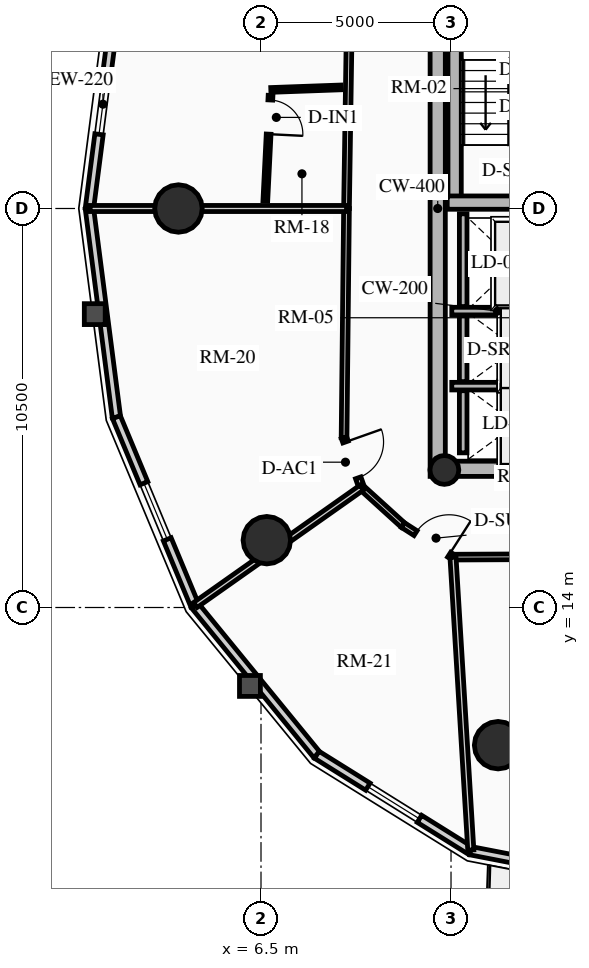
"""IFC4 building model, lengths in metres.
Left out: names, types, materials, properties, quantities, classifications, styles, units other than length and angle.
Written with IfcOpenShell. Run it as: python <this file> out.ifc"""

import sys

from ifc_helpers import new_model, si_unit, direction, frame, frame_2d, origin, origin_2d, place, context, subcontext, project, spatial, rectangle, circle, hollow_circle, extrude, source, transform, mapped, element, fill, save


model = new_model("IFC4")
c1 = context("Model", 3, precision=1e-05, world=origin(), true_north=direction((0.0, 1.0)))
c2 = subcontext(c1, "Body", "Model", "MODEL_VIEW")
j1 = project(units=[si_unit("LENGTHUNIT", "METRE"), si_unit("PLANEANGLEUNIT", "RADIAN")], contexts=[c1])
p1 = place(None, origin())
s1 = spatial("IfcSite", under=j1, at=p1, CompositionType="ELEMENT")
p2 = place(p1, origin())
s2 = spatial("IfcBuilding", under=s1, at=p2, CompositionType="ELEMENT")
p3 = place(p2, frame((0.0, 0.0, 154.51)))
s3 = spatial("IfcBuildingStorey", under=s2, at=p3, CompositionType="ELEMENT", Elevation=154.51)
p4 = place(p3, frame((11.15, 17.45, 0.0), z_axis=(0.0, 0.0, 1.0), x_axis=(0.0, 1.0, 0.0)))
e1 = element("IfcWall", 1, at=p4, inside=s3, PredefinedType="SHEAR", context=c2, shape_type="SweptSolid", body=[
    extrude(rectangle(XDim=14.1, YDim=0.4, at=frame_2d((7.05, 0.0))), origin(), (0.0, 0.0, 1.0), 2.91),
])
p5 = place(p3, frame((11.15, 17.65, 0.0), z_axis=(0.0, 0.0, 1.0), x_axis=(1.0, 0.0, 0.0)))
e2 = element("IfcWall", 2, at=p5, inside=s3, PredefinedType="SHEAR", context=c2, shape_type="SweptSolid", body=[
    extrude(rectangle(XDim=10.7, YDim=0.4, at=frame_2d((5.35, 0.0))), origin(), (0.0, 0.0, 1.0), 2.91),
])
m1 = source(origin(), c2, "Body", "SweptSolid", [
    extrude(rectangle(XDim=1.5, YDim=2.02, at=frame_2d((0.75, 1.01))), frame((0.0, 0.21, 0.0), z_axis=(0.0, -1.0, 0.0), x_axis=(1.0, 0.0, 0.0)), (0.0, 0.0, 1.0), 0.42),
])
p6 = place(p5, frame((5.45, 0.0, 0.0)))
e3 = element("IfcOpeningElement", 3, at=p6, cuts=e2, PredefinedType="OPENING", context=c2, shape_type="MappedRepresentation", body=[
    mapped(m1, transform((0.0, 0.0, 0.0), x_axis=(1.0, 0.0, 0.0), y_axis=(0.0, 1.0, 0.0), z_axis=(0.0, 0.0, 1.0), scale=1.0)),
])
p7 = place(p3, frame((11.595, 24.655, 0.0), z_axis=(0.0, 0.0, 1.0), x_axis=(0.0, 1.0, 0.0)))
e4 = element("IfcWall", 4, at=p7, inside=s3, PredefinedType="SHEAR", context=c2, shape_type="SweptSolid", body=[
    extrude(rectangle(XDim=6.695, YDim=0.35, at=frame_2d((3.348, 0.0))), origin(), (0.0, 0.0, 1.0), 2.91),
])
p8 = place(p3, frame((11.4, 24.655, 0.0), z_axis=(0.0, 0.0, 1.0), x_axis=(1.0, 0.0, 0.0)))
e5 = element("IfcWall", 5, at=p8, inside=s3, PredefinedType="SHEAR", context=c2, shape_type="SweptSolid", body=[
    extrude(rectangle(XDim=3.285, YDim=0.35, at=frame_2d((1.643, 0.0))), origin(), (0.0, 0.0, 1.0), 2.91),
])
p9 = place(p3, frame((11.325, 17.62, 0.0), z_axis=(0.0, 0.0, 1.0), x_axis=(1.0, 0.0, 0.0)))
e6 = element("IfcColumn", 6, at=p9, inside=s3, PredefinedType="COLUMN", context=c2, shape_type="SweptSolid", body=[
    extrude(hollow_circle(Radius=0.38, WallThickness=0.032, at=origin_2d()), origin(), (0.0, 0.0, 1.0), 2.91),
])
for number, where, z_axis, x_axis in (
    (7, (4.328, 24.5, 0.0), (0.0, 0.0, 1.0), (1.0, 0.0, 0.0)),
    (8, (6.653, 15.771, 0.0), (0.0, 0.0, 1.0), (1.0, 0.0, 0.0)),
    (9, (12.739, 10.377, 0.0), (0.0, 0.0, 1.0), (1.0, 0.0, 0.0)),
):
    element("IfcColumn", number, at=place(p3, frame(where, z_axis=z_axis, x_axis=x_axis)), inside=s3, PredefinedType="USERDEFINED", context=c2, shape_type="SweptSolid", body=[
        extrude(circle(Radius=0.625, at=origin_2d()), origin(), (0.0, 0.0, 1.0), 2.91),
    ])
p10 = place(p3, frame((1.985, 24.5, 0.0), z_axis=(0.0, 0.0, 1.0), x_axis=(0.128266533912, 0.991739732126, 0.0)))
e10 = element("IfcWall", 10, at=p10, inside=s3, PredefinedType="SOLIDWALL", context=c2, shape_type="SweptSolid", body=[
    extrude(rectangle(XDim=5.537, YDim=0.22, at=frame_2d((2.769, 0.0))), origin(), (0.0, 0.0, 1.0), 2.245),
])
m2 = source(origin(), c2, "Body", "SweptSolid", [
    extrude(rectangle(XDim=1.6, YDim=1.3, at=frame_2d((0.8, 0.65))), frame((0.0, 0.12, 0.0), z_axis=(0.0, -1.0, 0.0), x_axis=(1.0, 0.0, 0.0)), (0.0, 0.0, 1.0), 0.24),
])
p11 = place(p10, frame((1.968, 0.0, 0.65)))
e11 = element("IfcOpeningElement", 11, at=p11, cuts=e10, PredefinedType="OPENING", context=c2, shape_type="MappedRepresentation", body=[
    mapped(m2, transform((0.0, 0.0, 0.0), x_axis=(1.0, 0.0, 0.0), y_axis=(0.0, 1.0, 0.0), z_axis=(0.0, 0.0, 1.0), scale=1.0)),
])
p12 = place(p3, frame((2.695, 19.009, 0.0), z_axis=(0.0, 0.0, 1.0), x_axis=(-0.128266533912, 0.991739732126, 0.0)))
e12 = element("IfcWall", 12, at=p12, inside=s3, PredefinedType="SOLIDWALL", context=c2, shape_type="SweptSolid", body=[
    extrude(rectangle(XDim=5.537, YDim=0.22, at=frame_2d((2.769, 0.0))), origin(), (0.0, 0.0, 1.0), 2.245),
])
p13 = place(p3, frame((4.757, 14.055, 0.0), z_axis=(0.0, 0.0, 1.0), x_axis=(-0.384259959969, 0.923224936386, 0.0)))
e13 = element("IfcWall", 13, at=p13, inside=s3, PredefinedType="SOLIDWALL", context=c2, shape_type="SweptSolid", body=[
    extrude(rectangle(XDim=5.365, YDim=0.22, at=frame_2d((2.683, 0.0))), origin(), (0.0, 0.0, 1.0), 2.245),
])
p14 = place(p13, frame((1.883, 0.0, 0.65)))
e14 = element("IfcOpeningElement", 14, at=p14, cuts=e13, PredefinedType="OPENING", context=c2, shape_type="MappedRepresentation", body=[
    mapped(m2, transform((0.0, 0.0, 0.0), x_axis=(1.0, 0.0, 0.0), y_axis=(0.0, 1.0, 0.0), z_axis=(0.0, 0.0, 1.0), scale=1.0)),
])
p15 = place(p3, frame((7.968, 10.124, 0.0), z_axis=(0.0, 0.0, 1.0), x_axis=(-0.632598524901, 0.774479894053, 0.0)))
e15 = element("IfcWall", 15, at=p15, inside=s3, PredefinedType="SOLIDWALL", context=c2, shape_type="SweptSolid", body=[
    extrude(rectangle(XDim=5.076, YDim=0.22, at=frame_2d((2.538, 0.0))), origin(), (0.0, 0.0, 1.0), 2.245),
])
p16 = place(p3, frame((12.015, 7.6, 0.0), z_axis=(0.0, 0.0, 1.0), x_axis=(-0.848452391194, 0.529271707044, 0.0)))
e16 = element("IfcWall", 16, at=p16, inside=s3, PredefinedType="SOLIDWALL", context=c2, shape_type="SweptSolid", body=[
    extrude(rectangle(XDim=4.769, YDim=0.22, at=frame_2d((2.385, 0.0))), origin(), (0.0, 0.0, 1.0), 2.245),
])
p17 = place(p16, frame((1.585, 0.0, 0.65)))
e17 = element("IfcOpeningElement", 17, at=p17, cuts=e16, PredefinedType="OPENING", context=c2, shape_type="MappedRepresentation", body=[
    mapped(m2, transform((0.0, 0.0, 0.0), x_axis=(1.0, 0.0, 0.0), y_axis=(0.0, 1.0, 0.0), z_axis=(0.0, 0.0, 1.0), scale=1.0)),
])
p18 = place(p3, frame((16.5, 6.73, 0.0), z_axis=(0.0, 0.0, 1.0), x_axis=(-0.981718699963, 0.190337579429, 0.0)))
e18 = element("IfcWall", 18, at=p18, inside=s3, PredefinedType="SOLIDWALL", context=c2, shape_type="SweptSolid", body=[
    extrude(rectangle(XDim=4.569, YDim=0.22, at=frame_2d((2.284, 0.0))), origin(), (0.0, 0.0, 1.0), 2.245),
])
m3 = source(origin(), c2, "Body", "SweptSolid", [
    extrude(rectangle(XDim=1.15, YDim=2.005, at=frame_2d((0.575, 1.002))), frame((0.0, 0.12, 0.0), z_axis=(0.0, -1.0, 0.0), x_axis=(1.0, 0.0, 0.0)), (0.0, 0.0, 1.0), 0.24),
])
p19 = place(p18, frame((1.709, 0.0, 0.0)))
e19 = element("IfcOpeningElement", 19, at=p19, cuts=e18, PredefinedType="OPENING", context=c2, shape_type="MappedRepresentation", body=[
    mapped(m3, transform((0.0, 0.0, 0.0), x_axis=(1.0, 0.0, 0.0), y_axis=(0.0, 1.0, 0.0), z_axis=(0.0, 0.0, 1.0), scale=1.0)),
])
p20 = place(p3, frame((11.52, 21.8, 0.0), z_axis=(0.0, 0.0, 1.0), x_axis=(1.0, 0.0, 0.0)))
e20 = element("IfcWall", 20, at=p20, inside=s3, PredefinedType="SHEAR", context=c2, shape_type="SweptSolid", body=[
    extrude(rectangle(XDim=2.97, YDim=0.2, at=frame_2d((1.485, 0.0))), origin(), (0.0, 0.0, 1.0), 2.91),
])
p21 = place(p3, frame((11.82, 21.92, 0.0), z_axis=(0.0, 0.0, 1.0), x_axis=(0.0, 1.0, 0.0)))
e21 = element("IfcWall", 21, at=p21, inside=s3, PredefinedType="SHEAR", context=c2, shape_type="SweptSolid", body=[
    extrude(rectangle(XDim=2.44, YDim=0.2, at=frame_2d((1.22, 0.0))), origin(), (0.0, 0.0, 1.0), 2.91),
])
p22 = place(p3, frame((11.52, 19.825, 0.0), z_axis=(0.0, 0.0, 1.0), x_axis=(1.0, 0.0, 0.0)))
e22 = element("IfcWall", 22, at=p22, inside=s3, PredefinedType="SHEAR", context=c2, shape_type="SweptSolid", body=[
    extrude(rectangle(XDim=2.97, YDim=0.2, at=frame_2d((1.485, 0.0))), origin(), (0.0, 0.0, 1.0), 2.91),
])
p23 = place(p3, frame((11.82, 19.945, 0.0), z_axis=(0.0, 0.0, 1.0), x_axis=(0.0, 1.0, 0.0)))
e23 = element("IfcWall", 23, at=p23, inside=s3, PredefinedType="SHEAR", context=c2, shape_type="SweptSolid", body=[
    extrude(rectangle(XDim=1.735, YDim=0.2, at=frame_2d((0.867, 0.0))), origin(), (0.0, 0.0, 1.0), 2.91),
])
p24 = place(p3, frame((11.82, 18.07, 0.0), z_axis=(0.0, 0.0, 1.0), x_axis=(0.0, 1.0, 0.0)))
e24 = element("IfcWall", 24, at=p24, inside=s3, PredefinedType="SHEAR", context=c2, shape_type="SweptSolid", body=[
    extrude(rectangle(XDim=1.635, YDim=0.2, at=frame_2d((0.817, 0.0))), origin(), (0.0, 0.0, 1.0), 2.91),
])
p25 = place(p3, frame((8.84, 30.414, 0.0), z_axis=(0.0, 0.0, 1.0), x_axis=(-0.01514915101, -0.999885245027, 0.0)))
e25 = element("IfcWall", 25, at=p25, inside=s3, PredefinedType="PARTITIONING", context=c2, shape_type="SweptSolid", body=[
    extrude(rectangle(XDim=5.915, YDim=0.15, at=frame_2d((2.957, 0.0))), origin(), (0.0, 0.0, 1.0), 2.675),
])
p26 = place(p3, frame((8.75, 24.5, 0.0), z_axis=(0.0, 0.0, 1.0), x_axis=(-0.01076642715, -0.999942040344, 0.0)))
e26 = element("IfcWall", 26, at=p26, inside=s3, PredefinedType="PARTITIONING", context=c2, shape_type="SweptSolid", body=[
    extrude(rectangle(XDim=6.032, YDim=0.15, at=frame_2d((3.016, 0.0))), origin(), (0.0, 0.0, 1.0), 2.245),
])
p27 = place(p3, frame((8.685, 18.469, 0.0), z_axis=(0.0, 0.0, 1.0), x_axis=(0.333415749461, -0.942779899028, 0.0)))
e27 = element("IfcWall", 27, at=p27, inside=s3, PredefinedType="PARTITIONING", context=c2, shape_type="SweptSolid", body=[
    extrude(rectangle(XDim=1.394, YDim=0.15, at=frame_2d((0.697, 0.0))), origin(), (0.0, 0.0, 1.0), 2.245),
])
m4 = source(origin(), c2, "Body", "SweptSolid", [
    extrude(rectangle(XDim=1.0, YDim=2.015, at=frame_2d((0.5, 1.007))), frame((0.0, 0.085, 0.0), z_axis=(0.0, -1.0, 0.0), x_axis=(1.0, 0.0, 0.0)), (0.0, 0.0, 1.0), 0.17),
])
p28 = place(p27, frame((0.12, 0.0, 0.0)))
e28 = element("IfcOpeningElement", 28, at=p28, cuts=e27, PredefinedType="OPENING", context=c2, shape_type="MappedRepresentation", body=[
    mapped(m4, transform((0.0, 0.0, 0.0), x_axis=(1.0, 0.0, 0.0), y_axis=(0.0, 1.0, 0.0), z_axis=(0.0, 0.0, 1.0), scale=1.0)),
])
p29 = place(p3, frame((9.15, 17.155, 0.0), z_axis=(0.0, 0.0, 1.0), x_axis=(0.740451494731, -0.672109800517, 0.0)))
e29 = element("IfcWall", 29, at=p29, inside=s3, PredefinedType="PARTITIONING", context=c2, shape_type="SweptSolid", body=[
    extrude(rectangle(XDim=1.468, YDim=0.15, at=frame_2d((0.734, 0.0))), origin(), (0.0, 0.0, 1.0), 2.245),
])
p30 = place(p3, frame((10.237, 16.168, 0.0), z_axis=(0.0, 0.0, 1.0), x_axis=(0.842061223587, -0.53938195718, 0.0)))
e30 = element("IfcWall", 30, at=p30, inside=s3, PredefinedType="PARTITIONING", context=c2, shape_type="SweptSolid", body=[
    extrude(rectangle(XDim=1.562, YDim=0.15, at=frame_2d((0.781, 0.0))), origin(), (0.0, 0.0, 1.0), 2.245),
])
m5 = source(origin(), c2, "Body", "SweptSolid", [
    extrude(rectangle(XDim=1.05, YDim=2.015, at=frame_2d((0.525, 1.007))), frame((0.0, 0.085, 0.0), z_axis=(0.0, -1.0, 0.0), x_axis=(1.0, 0.0, 0.0)), (0.0, 0.0, 1.0), 0.17),
])
p31 = place(p30, frame((0.392, 0.0, 0.0)))
e31 = element("IfcOpeningElement", 31, at=p31, cuts=e30, PredefinedType="OPENING", context=c2, shape_type="MappedRepresentation", body=[
    mapped(m5, transform((0.0, 0.0, 0.0), x_axis=(1.0, 0.0, 0.0), y_axis=(0.0, 1.0, 0.0), z_axis=(0.0, 0.0, 1.0), scale=1.0)),
])
p32 = place(p3, frame((11.552, 15.326, 0.0), z_axis=(0.0, 0.0, 1.0), x_axis=(0.999989573465, 0.004566504266, 0.0)))
e32 = element("IfcWall", 32, at=p32, inside=s3, PredefinedType="PARTITIONING", context=c2, shape_type="SweptSolid", body=[
    extrude(rectangle(XDim=3.261, YDim=0.15, at=frame_2d((1.631, 0.0))), origin(), (0.0, 0.0, 1.0), 2.245),
])
p33 = place(p3, frame((8.75, 24.5, 0.0), z_axis=(0.0, 0.0, 1.0), x_axis=(-1.0, 0.0, 0.0)))
e33 = element("IfcWall", 33, at=p33, inside=s3, PredefinedType="PARTITIONING", context=c2, shape_type="SweptSolid", body=[
    extrude(rectangle(XDim=6.745, YDim=0.16, at=frame_2d((3.373, 0.0))), origin(), (0.0, 0.0, 1.0), 2.245),
])
p34 = place(p3, frame((9.15, 17.155, 0.0), z_axis=(0.0, 0.0, 1.0), x_axis=(-0.81708911443, -0.576511386774, 0.0)))
e34 = element("IfcWall", 34, at=p34, inside=s3, PredefinedType="PARTITIONING", context=c2, shape_type="SweptSolid", body=[
    extrude(rectangle(XDim=5.356, YDim=0.16, at=frame_2d((2.678, 0.0))), origin(), (0.0, 0.0, 1.0), 2.245),
])
p35 = place(p3, frame((11.552, 15.326, 0.0), z_axis=(0.0, 0.0, 1.0), x_axis=(0.060740403573, -0.998153597085, 0.0)))
e35 = element("IfcWall", 35, at=p35, inside=s3, PredefinedType="PARTITIONING", context=c2, shape_type="SweptSolid", body=[
    extrude(rectangle(XDim=7.721, YDim=0.16, at=frame_2d((3.861, 0.0))), origin(), (0.0, 0.0, 1.0), 2.245),
])
p36 = place(p3, frame((8.606, 27.687, 0.0), z_axis=(0.0, 0.0, 1.0), x_axis=(-0.999349834195, -0.036054249337, 0.0)))
e36 = element("IfcWall", 36, at=p36, inside=s3, PredefinedType="PARTITIONING", context=c2, shape_type="SweptSolid", body=[
    extrude(rectangle(XDim=1.849, YDim=0.125, at=frame_2d((0.924, 0.0))), origin(), (0.0, 0.0, 1.0), 2.675),
])
p37 = place(p3, frame((6.751, 27.475, 0.0), z_axis=(0.0, 0.0, 1.0), x_axis=(-0.049591166042, -0.998769601185, 0.0)))
e37 = element("IfcWall", 37, at=p37, inside=s3, PredefinedType="PARTITIONING", context=c2, shape_type="SweptSolid", body=[
    extrude(rectangle(XDim=2.777, YDim=0.125, at=frame_2d((1.388, 0.0))), origin(), (0.0, 0.0, 1.0), 2.675),
])
m6 = source(origin(), c2, "Body", "SweptSolid", [
    extrude(rectangle(XDim=0.9, YDim=2.005, at=frame_2d((0.45, 1.002))), frame((0.0, 0.073, 0.0), z_axis=(0.0, -1.0, 0.0), x_axis=(1.0, 0.0, 0.0)), (0.0, 0.0, 1.0), 0.145),
])
p38 = place(p37, frame((0.12, 0.0, 0.0)))
e38 = element("IfcOpeningElement", 38, at=p38, cuts=e37, PredefinedType="OPENING", context=c2, shape_type="MappedRepresentation", body=[
    mapped(m6, transform((0.0, 0.0, 0.0), x_axis=(1.0, 0.0, 0.0), y_axis=(0.0, 1.0, 0.0), z_axis=(0.0, 0.0, 1.0), scale=1.0)),
])
m7 = source(origin(), c2, "Body", "SweptSolid", [
    extrude(rectangle(XDim=1.6, YDim=1.3, at=frame_2d((0.8, 0.65))), frame((0.0, 0.03, 0.0), z_axis=(0.0, -1.0, 0.0), x_axis=(1.0, 0.0, 0.0)), (0.0, 0.0, 1.0), 0.06),
])
p39 = place(p11, origin())
e39 = element("IfcWindow", 39, at=p39, inside=s3, PartitioningType="SINGLE_PANEL", PredefinedType="WINDOW", context=c2, shape_type="MappedRepresentation", body=[
    mapped(m7, transform((0.0, 0.0, 0.0), x_axis=(1.0, 0.0, 0.0), y_axis=(0.0, 1.0, 0.0), z_axis=(0.0, 0.0, 1.0), scale=1.0)),
])
fill(e11, e39)
p40 = place(p14, origin())
e40 = element("IfcWindow", 40, at=p40, inside=s3, PartitioningType="SINGLE_PANEL", PredefinedType="WINDOW", context=c2, shape_type="MappedRepresentation", body=[
    mapped(m7, transform((0.0, 0.0, 0.0), x_axis=(1.0, 0.0, 0.0), y_axis=(0.0, 1.0, 0.0), z_axis=(0.0, 0.0, 1.0), scale=1.0)),
])
fill(e14, e40)
p41 = place(p17, origin())
e41 = element("IfcWindow", 41, at=p41, inside=s3, PartitioningType="SINGLE_PANEL", PredefinedType="WINDOW", context=c2, shape_type="MappedRepresentation", body=[
    mapped(m7, transform((0.0, 0.0, 0.0), x_axis=(1.0, 0.0, 0.0), y_axis=(0.0, 1.0, 0.0), z_axis=(0.0, 0.0, 1.0), scale=1.0)),
])
fill(e17, e41)
m8 = source(origin(), c2, "Body", "SweptSolid", [
    extrude(rectangle(XDim=0.9, YDim=2.005, at=frame_2d((0.45, 1.002))), frame((0.0, 0.025, 0.0), z_axis=(0.0, -1.0, 0.0), x_axis=(1.0, 0.0, 0.0)), (0.0, 0.0, 1.0), 0.05),
])
p42 = place(p38, origin())
e42 = element("IfcDoor", 42, at=p42, inside=s3, OperationType="SINGLE_SWING_RIGHT", PredefinedType="DOOR", context=c2, shape_type="MappedRepresentation", body=[
    mapped(m8, transform((0.0, 0.0, 0.0), x_axis=(1.0, 0.0, 0.0), y_axis=(0.0, 1.0, 0.0), z_axis=(0.0, 0.0, 1.0), scale=1.0)),
])
fill(e38, e42)
m9 = source(origin(), c2, "Body", "SweptSolid", [
    extrude(rectangle(XDim=1.0, YDim=2.015, at=frame_2d((0.5, 1.007))), frame((0.0, 0.025, 0.0), z_axis=(0.0, -1.0, 0.0), x_axis=(1.0, 0.0, 0.0)), (0.0, 0.0, 1.0), 0.05),
])
p43 = place(p28, origin())
e43 = element("IfcDoor", 43, at=p43, inside=s3, OperationType="SINGLE_SWING_LEFT", PredefinedType="DOOR", context=c2, shape_type="MappedRepresentation", body=[
    mapped(m9, transform((0.0, 0.0, 0.0), x_axis=(1.0, 0.0, 0.0), y_axis=(0.0, 1.0, 0.0), z_axis=(0.0, 0.0, 1.0), scale=1.0)),
])
fill(e28, e43)
m10 = source(origin(), c2, "Body", "SweptSolid", [
    extrude(rectangle(XDim=1.05, YDim=2.015, at=frame_2d((0.525, 1.007))), frame((0.0, 0.025, 0.0), z_axis=(0.0, -1.0, 0.0), x_axis=(1.0, 0.0, 0.0)), (0.0, 0.0, 1.0), 0.05),
])
p44 = place(p31, origin())
e44 = element("IfcDoor", 44, at=p44, inside=s3, OperationType="SINGLE_SWING_RIGHT", PredefinedType="DOOR", context=c2, shape_type="MappedRepresentation", body=[
    mapped(m10, transform((0.0, 0.0, 0.0), x_axis=(1.0, 0.0, 0.0), y_axis=(0.0, 1.0, 0.0), z_axis=(0.0, 0.0, 1.0), scale=1.0)),
])
fill(e31, e44)
save(model, sys.argv[1])
